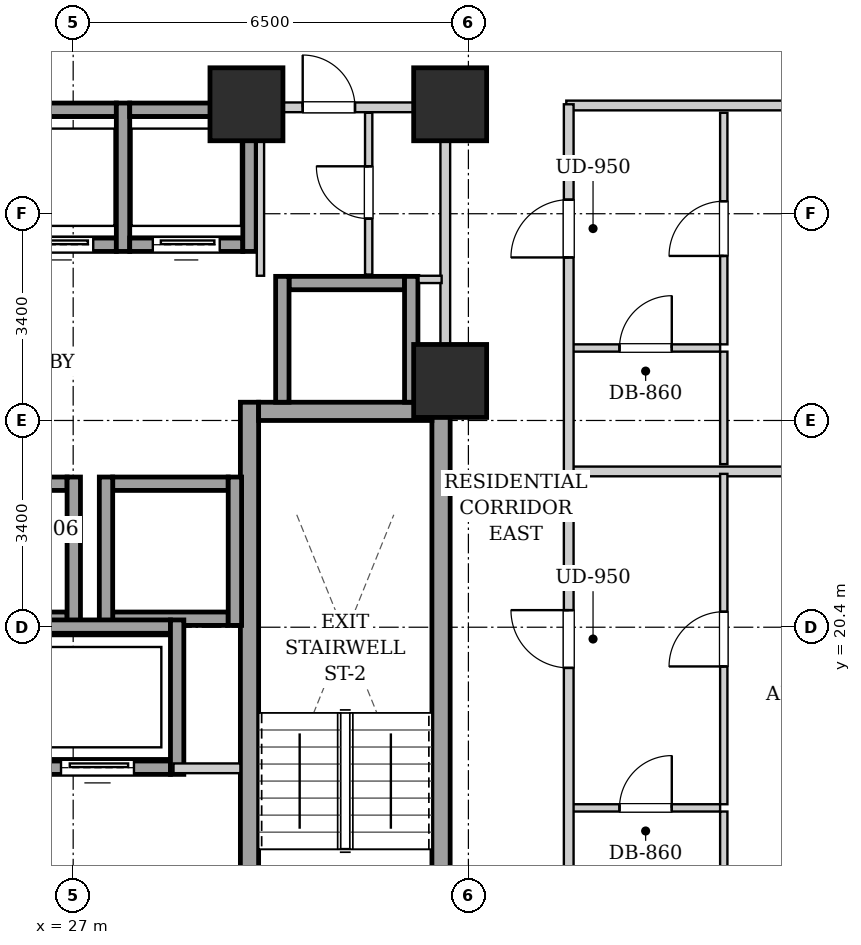
"""IFC4 building model, lengths in metres.
Left out: names, types, materials, properties, quantities, classifications, styles, units other than length and angle.
Written with IfcOpenShell. Run it as: python <this file> out.ifc"""

import sys

from ifc_helpers import new_model, si_unit, direction, frame, frame_2d, origin, origin_2d, place, context, subcontext, project, spatial, rectangle, extrude, element, fill, save


model = new_model("IFC4")
c1 = context("Model", 3, precision=1e-05, world=origin(), true_north=direction((0.0, 1.0)))
c2 = subcontext(c1, "Body", "Model", "MODEL_VIEW")
j1 = project(units=[si_unit("LENGTHUNIT", "METRE"), si_unit("PLANEANGLEUNIT", "RADIAN")], contexts=[c1])
p1 = place(None, origin())
s1 = spatial("IfcSite", under=j1, at=p1, CompositionType="ELEMENT")
p2 = place(p1, origin())
s2 = spatial("IfcBuilding", under=s1, at=p2, CompositionType="ELEMENT")
p3 = place(p2, frame((0.0, 0.0, 32.2)))
s3 = spatial("IfcBuildingStorey", under=s2, at=p3, CompositionType="ELEMENT", Elevation=32.2)
for number, where, z_axis, x_axis in (
    (1, (29.85, 29.0, 0.0), (0.0, 0.0, 1.0), (1.0, 0.0, 0.0)),
    (2, (33.2, 29.0, 0.0), (0.0, 0.0, 1.0), (1.0, 0.0, 0.0)),
    (3, (33.2, 24.45, 0.0), (0.0, 0.0, 1.0), (1.0, 0.0, 0.0)),
):
    element("IfcColumn", number, at=place(p3, frame(where, z_axis=z_axis, x_axis=x_axis)), inside=s3, PredefinedType="COLUMN", context=c2, shape_type="SweptSolid", body=[
        extrude(rectangle(XDim=1.2, YDim=1.2, at=origin_2d()), origin(), (0.0, 0.0, 1.0), 3.2),
    ])
for number, where, z_axis, x_axis in (
    (4, (29.9, 15.1, 0.0), (0.0, 0.0, 1.0), (0.0, 1.0, 0.0)),
    (5, (33.05, 15.1, 0.0), (0.0, 0.0, 1.0), (0.0, 1.0, 0.0)),
):
    element("IfcWall", number, at=place(p3, frame(where, z_axis=z_axis, x_axis=x_axis)), inside=s3, PredefinedType="SHEAR", context=c2, shape_type="SweptSolid", body=[
        extrude(rectangle(XDim=9.0, YDim=0.3, at=frame_2d((4.5, 0.0))), origin(), (0.0, 0.0, 1.0), 2.94),
    ])
p4 = place(p3, frame((30.05, 23.95, 0.0), z_axis=(0.0, 0.0, 1.0), x_axis=(1.0, 0.0, 0.0)))
e6 = element("IfcWall", 6, at=p4, inside=s3, PredefinedType="SHEAR", context=c2, shape_type="SweptSolid", body=[
    extrude(rectangle(XDim=2.85, YDim=0.3, at=frame_2d((1.425, 0.0))), origin(), (0.0, 0.0, 1.0), 2.94),
])
p5 = place(p3, frame((25.85, 26.69, 0.0), z_axis=(0.0, 0.0, 1.0), x_axis=(1.0, 0.0, 0.0)))
e7 = element("IfcWall", 7, at=p5, inside=s3, PredefinedType="SHEAR", context=c2, shape_type="SweptSolid", body=[
    extrude(rectangle(XDim=1.86, YDim=0.22, at=frame_2d((0.93, 0.0))), origin(), (0.0, 0.0, 1.0), 2.94),
])
p6 = place(p5, frame((0.38, 0.0, 0.0)))
e8 = element("IfcOpeningElement", 8, at=p6, cuts=e7, PredefinedType="OPENING", context=c2, shape_type="SweptSolid", body=[
    extrude(rectangle(XDim=1.1, YDim=2.15, at=frame_2d((0.55, 1.075))), frame((0.0, 0.12, 0.0), z_axis=(0.0, -1.0, 0.0), x_axis=(1.0, 0.0, 0.0)), (0.0, 0.0, 1.0), 0.24),
])
p7 = place(p3, frame((25.85, 28.91, 0.0), z_axis=(0.0, 0.0, 1.0), x_axis=(1.0, 0.0, 0.0)))
e9 = element("IfcWall", 9, at=p7, inside=s3, PredefinedType="SHEAR", context=c2, shape_type="SweptSolid", body=[
    extrude(rectangle(XDim=1.86, YDim=0.22, at=frame_2d((0.93, 0.0))), origin(), (0.0, 0.0, 1.0), 2.94),
])
p8 = place(p3, frame((27.82, 26.58, 0.0), z_axis=(0.0, 0.0, 1.0), x_axis=(0.0, 1.0, 0.0)))
e10 = element("IfcWall", 10, at=p8, inside=s3, PredefinedType="SHEAR", context=c2, shape_type="SweptSolid", body=[
    extrude(rectangle(XDim=2.44, YDim=0.22, at=frame_2d((1.22, 0.0))), origin(), (0.0, 0.0, 1.0), 2.94),
])
p9 = place(p3, frame((27.93, 26.69, 0.0), z_axis=(0.0, 0.0, 1.0), x_axis=(1.0, 0.0, 0.0)))
e11 = element("IfcWall", 11, at=p9, inside=s3, PredefinedType="SHEAR", context=c2, shape_type="SweptSolid", body=[
    extrude(rectangle(XDim=1.86, YDim=0.22, at=frame_2d((0.93, 0.0))), origin(), (0.0, 0.0, 1.0), 2.94),
])
p10 = place(p9, frame((0.38, 0.0, 0.0)))
e12 = element("IfcOpeningElement", 12, at=p10, cuts=e11, PredefinedType="OPENING", context=c2, shape_type="SweptSolid", body=[
    extrude(rectangle(XDim=1.1, YDim=2.15, at=frame_2d((0.55, 1.075))), frame((0.0, 0.12, 0.0), z_axis=(0.0, -1.0, 0.0), x_axis=(1.0, 0.0, 0.0)), (0.0, 0.0, 1.0), 0.24),
])
p11 = place(p3, frame((27.93, 28.91, 0.0), z_axis=(0.0, 0.0, 1.0), x_axis=(1.0, 0.0, 0.0)))
e13 = element("IfcWall", 13, at=p11, inside=s3, PredefinedType="SHEAR", context=c2, shape_type="SweptSolid", body=[
    extrude(rectangle(XDim=1.86, YDim=0.22, at=frame_2d((0.93, 0.0))), origin(), (0.0, 0.0, 1.0), 2.94),
])
p12 = place(p3, frame((29.9, 26.58, 0.0), z_axis=(0.0, 0.0, 1.0), x_axis=(0.0, 1.0, 0.0)))
e14 = element("IfcWall", 14, at=p12, inside=s3, PredefinedType="SHEAR", context=c2, shape_type="SweptSolid", body=[
    extrude(rectangle(XDim=2.44, YDim=0.22, at=frame_2d((1.22, 0.0))), origin(), (0.0, 0.0, 1.0), 2.94),
])
for number, where, z_axis, x_axis in (
    (15, (25.0, 20.54, 0.0), (0.0, 0.0, 1.0), (1.0, 0.0, 0.0)),
    (16, (25.0, 22.76, 0.0), (0.0, 0.0, 1.0), (1.0, 0.0, 0.0)),
):
    element("IfcWall", number, at=place(p3, frame(where, z_axis=z_axis, x_axis=x_axis)), inside=s3, PredefinedType="SHEAR", context=c2, shape_type="SweptSolid", body=[
        extrude(rectangle(XDim=1.9, YDim=0.22, at=frame_2d((0.95, 0.0))), origin(), (0.0, 0.0, 1.0), 2.94),
    ])
p13 = place(p3, frame((27.01, 20.43, 0.0), z_axis=(0.0, 0.0, 1.0), x_axis=(0.0, 1.0, 0.0)))
e17 = element("IfcWall", 17, at=p13, inside=s3, PredefinedType="SHEAR", context=c2, shape_type="SweptSolid", body=[
    extrude(rectangle(XDim=2.44, YDim=0.22, at=frame_2d((1.22, 0.0))), origin(), (0.0, 0.0, 1.0), 2.94),
])
for number, where, z_axis, x_axis in (
    (18, (27.65, 20.54, 0.0), (0.0, 0.0, 1.0), (1.0, 0.0, 0.0)),
    (19, (27.65, 22.76, 0.0), (0.0, 0.0, 1.0), (1.0, 0.0, 0.0)),
):
    element("IfcWall", number, at=place(p3, frame(where, z_axis=z_axis, x_axis=x_axis)), inside=s3, PredefinedType="SHEAR", context=c2, shape_type="SweptSolid", body=[
        extrude(rectangle(XDim=1.9, YDim=0.22, at=frame_2d((0.95, 0.0))), origin(), (0.0, 0.0, 1.0), 2.94),
    ])
for number, where, z_axis, x_axis in (
    (20, (27.54, 20.43, 0.0), (0.0, 0.0, 1.0), (0.0, 1.0, 0.0)),
    (21, (29.66, 20.43, 0.0), (0.0, 0.0, 1.0), (0.0, 1.0, 0.0)),
):
    element("IfcWall", number, at=place(p3, frame(where, z_axis=z_axis, x_axis=x_axis)), inside=s3, PredefinedType="SHEAR", context=c2, shape_type="SweptSolid", body=[
        extrude(rectangle(XDim=2.44, YDim=0.22, at=frame_2d((1.22, 0.0))), origin(), (0.0, 0.0, 1.0), 2.94),
    ])
p14 = place(p3, frame((30.55, 26.06, 0.0), z_axis=(0.0, 0.0, 1.0), x_axis=(1.0, 0.0, 0.0)))
e22 = element("IfcWall", 22, at=p14, inside=s3, PredefinedType="SHEAR", context=c2, shape_type="SweptSolid", body=[
    extrude(rectangle(XDim=1.9, YDim=0.22, at=frame_2d((0.95, 0.0))), origin(), (0.0, 0.0, 1.0), 2.94),
])
for number, where, z_axis, x_axis in (
    (23, (30.44, 24.1, 0.0), (0.0, 0.0, 1.0), (0.0, 1.0, 0.0)),
    (24, (32.56, 24.1, 0.0), (0.0, 0.0, 1.0), (0.0, 1.0, 0.0)),
):
    element("IfcWall", number, at=place(p3, frame(where, z_axis=z_axis, x_axis=x_axis)), inside=s3, PredefinedType="SHEAR", context=c2, shape_type="SweptSolid", body=[
        extrude(rectangle(XDim=2.07, YDim=0.22, at=frame_2d((1.035, 0.0))), origin(), (0.0, 0.0, 1.0), 2.94),
    ])
p15 = place(p3, frame((26.2, 18.09, 0.0), z_axis=(0.0, 0.0, 1.0), x_axis=(1.0, 0.0, 0.0)))
e25 = element("IfcWall", 25, at=p15, inside=s3, PredefinedType="SHEAR", context=c2, shape_type="SweptSolid", body=[
    extrude(rectangle(XDim=2.4, YDim=0.22, at=frame_2d((1.2, 0.0))), origin(), (0.0, 0.0, 1.0), 2.94),
])
p16 = place(p15, frame((0.6, 0.0, 0.0)))
e26 = element("IfcOpeningElement", 26, at=p16, cuts=e25, PredefinedType="OPENING", context=c2, shape_type="SweptSolid", body=[
    extrude(rectangle(XDim=1.2, YDim=2.15, at=frame_2d((0.6, 1.075))), frame((0.0, 0.12, 0.0), z_axis=(0.0, -1.0, 0.0), x_axis=(1.0, 0.0, 0.0)), (0.0, 0.0, 1.0), 0.24),
])
p17 = place(p3, frame((26.2, 20.41, 0.0), z_axis=(0.0, 0.0, 1.0), x_axis=(1.0, 0.0, 0.0)))
e27 = element("IfcWall", 27, at=p17, inside=s3, PredefinedType="SHEAR", context=c2, shape_type="SweptSolid", body=[
    extrude(rectangle(XDim=2.4, YDim=0.22, at=frame_2d((1.2, 0.0))), origin(), (0.0, 0.0, 1.0), 2.94),
])
p18 = place(p3, frame((28.71, 17.98, 0.0), z_axis=(0.0, 0.0, 1.0), x_axis=(0.0, 1.0, 0.0)))
e28 = element("IfcWall", 28, at=p18, inside=s3, PredefinedType="SHEAR", context=c2, shape_type="SweptSolid", body=[
    extrude(rectangle(XDim=2.54, YDim=0.22, at=frame_2d((1.27, 0.0))), origin(), (0.0, 0.0, 1.0), 2.94),
])
p19 = place(p3, frame((28.65, 18.08, 0.0), z_axis=(0.0, 0.0, 1.0), x_axis=(1.0, 0.0, 0.0)))
e29 = element("IfcWall", 29, at=p19, inside=s3, PredefinedType="PARTITIONING", context=c2, shape_type="SweptSolid", body=[
    extrude(rectangle(XDim=1.1, YDim=0.16, at=frame_2d((0.55, 0.0))), origin(), (0.0, 0.0, 1.0), 2.94),
])
p20 = place(p3, frame((33.12, 24.12, 0.0), z_axis=(0.0, 0.0, 1.0), x_axis=(0.0, 1.0, 0.0)))
e30 = element("IfcWall", 30, at=p20, inside=s3, PredefinedType="PARTITIONING", context=c2, shape_type="SweptSolid", body=[
    extrude(rectangle(XDim=4.76, YDim=0.16, at=frame_2d((2.38, 0.0))), origin(), (0.0, 0.0, 1.0), 2.94),
])
p21 = place(p3, frame((30.08, 26.18, 0.0), z_axis=(0.0, 0.0, 1.0), x_axis=(0.0, 1.0, 0.0)))
e31 = element("IfcWall", 31, at=p21, inside=s3, PredefinedType="PARTITIONING", context=c2, shape_type="SweptSolid", body=[
    extrude(rectangle(XDim=2.68, YDim=0.12, at=frame_2d((1.34, 0.0))), origin(), (0.0, 0.0, 1.0), 2.94),
])
p22 = place(p3, frame((32.68, 26.12, 0.0), z_axis=(0.0, 0.0, 1.0), x_axis=(1.0, 0.0, 0.0)))
e32 = element("IfcWall", 32, at=p22, inside=s3, PredefinedType="PARTITIONING", context=c2, shape_type="SweptSolid", body=[
    extrude(rectangle(XDim=0.38, YDim=0.12, at=frame_2d((0.19, 0.0))), origin(), (0.0, 0.0, 1.0), 2.94),
])
p23 = place(p3, frame((31.86, 26.2, 0.0), z_axis=(0.0, 0.0, 1.0), x_axis=(0.0, 1.0, 0.0)))
e33 = element("IfcWall", 33, at=p23, inside=s3, PredefinedType="PARTITIONING", context=c2, shape_type="SweptSolid", body=[
    extrude(rectangle(XDim=2.66, YDim=0.12, at=frame_2d((1.33, 0.0))), origin(), (0.0, 0.0, 1.0), 2.94),
])
p24 = place(p23, frame((0.92, 0.0, 0.0)))
e34 = element("IfcOpeningElement", 34, at=p24, cuts=e33, PredefinedType="OPENING", context=c2, shape_type="SweptSolid", body=[
    extrude(rectangle(XDim=0.86, YDim=2.05, at=frame_2d((0.43, 1.025))), frame((0.0, 0.07, 0.0), z_axis=(0.0, -1.0, 0.0), x_axis=(1.0, 0.0, 0.0)), (0.0, 0.0, 1.0), 0.14),
])
p25 = place(p3, frame((30.08, 28.95, 0.0), z_axis=(0.0, 0.0, 1.0), x_axis=(1.0, 0.0, 0.0)))
e35 = element("IfcWall", 35, at=p25, inside=s3, PredefinedType="PARTITIONING", context=c2, shape_type="SweptSolid", body=[
    extrude(rectangle(XDim=2.96, YDim=0.16, at=frame_2d((1.48, 0.0))), origin(), (0.0, 0.0, 1.0), 2.94),
])
p26 = place(p25, frame((0.695, 0.0, 0.0)))
e36 = element("IfcOpeningElement", 36, at=p26, cuts=e35, PredefinedType="OPENING", context=c2, shape_type="SweptSolid", body=[
    extrude(rectangle(XDim=0.86, YDim=2.05, at=frame_2d((0.43, 1.025))), frame((0.0, 0.09, 0.0), z_axis=(0.0, -1.0, 0.0), x_axis=(1.0, 0.0, 0.0)), (0.0, 0.0, 1.0), 0.18),
])
p27 = place(p3, frame((35.11, 28.98, 0.0), z_axis=(0.0, 0.0, 1.0), x_axis=(1.0, 0.0, 0.0)))
e37 = element("IfcWall", 37, at=p27, inside=s3, PredefinedType="PARTITIONING", context=c2, shape_type="SweptSolid", body=[
    extrude(rectangle(XDim=11.11, YDim=0.16, at=frame_2d((5.555, 0.0))), origin(), (0.0, 0.0, 1.0), 2.155),
])
p28 = place(p3, frame((35.19, 22.962, 0.0), z_axis=(0.0, 0.0, 1.0), x_axis=(1.0, 0.0, 0.0)))
e38 = element("IfcWall", 38, at=p28, inside=s3, PredefinedType="PARTITIONING", context=c2, shape_type="SweptSolid", body=[
    extrude(rectangle(XDim=11.03, YDim=0.16, at=frame_2d((5.515, 0.0))), origin(), (0.0, 0.0, 1.0), 2.94),
])
p29 = place(p3, frame((35.19, 17.429, 0.0), z_axis=(0.0, 0.0, 1.0), x_axis=(1.0, 0.0, 0.0)))
e39 = element("IfcWall", 39, at=p29, inside=s3, PredefinedType="PARTITIONING", context=c2, shape_type="SweptSolid", body=[
    extrude(rectangle(XDim=2.45, YDim=0.12, at=frame_2d((1.225, 0.0))), origin(), (0.0, 0.0, 1.0), 2.94),
])
p30 = place(p29, frame((0.795, 0.0, 0.0)))
e40 = element("IfcOpeningElement", 40, at=p30, cuts=e39, PredefinedType="OPENING", context=c2, shape_type="SweptSolid", body=[
    extrude(rectangle(XDim=0.86, YDim=2.05, at=frame_2d((0.43, 1.025))), frame((0.0, 0.07, 0.0), z_axis=(0.0, -1.0, 0.0), x_axis=(1.0, 0.0, 0.0)), (0.0, 0.0, 1.0), 0.14),
])
p31 = place(p3, frame((37.7, 15.21, 0.0), z_axis=(0.0, 0.0, 1.0), x_axis=(0.0, 1.0, 0.0)))
e41 = element("IfcWall", 41, at=p31, inside=s3, PredefinedType="PARTITIONING", context=c2, shape_type="SweptSolid", body=[
    extrude(rectangle(XDim=2.159, YDim=0.12, at=frame_2d((1.08, 0.0))), origin(), (0.0, 0.0, 1.0), 2.94),
])
p32 = place(p3, frame((37.7, 17.489, 0.0), z_axis=(0.0, 0.0, 1.0), x_axis=(0.0, 1.0, 0.0)))
e42 = element("IfcWall", 42, at=p32, inside=s3, PredefinedType="PARTITIONING", context=c2, shape_type="SweptSolid", body=[
    extrude(rectangle(XDim=5.433, YDim=0.12, at=frame_2d((2.717, 0.0))), origin(), (0.0, 0.0, 1.0), 2.94),
])
p33 = place(p32, frame((2.266, 0.0, 0.0)))
e43 = element("IfcOpeningElement", 43, at=p33, cuts=e42, PredefinedType="OPENING", context=c2, shape_type="SweptSolid", body=[
    extrude(rectangle(XDim=0.9, YDim=2.05, at=frame_2d((0.45, 1.025))), frame((0.0, 0.07, 0.0), z_axis=(0.0, -1.0, 0.0), x_axis=(1.0, 0.0, 0.0)), (0.0, 0.0, 1.0), 0.14),
])
p34 = place(p3, frame((35.19, 24.992, 0.0), z_axis=(0.0, 0.0, 1.0), x_axis=(1.0, 0.0, 0.0)))
e44 = element("IfcWall", 44, at=p34, inside=s3, PredefinedType="PARTITIONING", context=c2, shape_type="SweptSolid", body=[
    extrude(rectangle(XDim=2.45, YDim=0.12, at=frame_2d((1.225, 0.0))), origin(), (0.0, 0.0, 1.0), 2.94),
])
p35 = place(p34, frame((0.795, 0.0, 0.0)))
e45 = element("IfcOpeningElement", 45, at=p35, cuts=e44, PredefinedType="OPENING", context=c2, shape_type="SweptSolid", body=[
    extrude(rectangle(XDim=0.86, YDim=2.05, at=frame_2d((0.43, 1.025))), frame((0.0, 0.07, 0.0), z_axis=(0.0, -1.0, 0.0), x_axis=(1.0, 0.0, 0.0)), (0.0, 0.0, 1.0), 0.14),
])
p36 = place(p3, frame((37.7, 23.082, 0.0), z_axis=(0.0, 0.0, 1.0), x_axis=(0.0, 1.0, 0.0)))
e46 = element("IfcWall", 46, at=p36, inside=s3, PredefinedType="PARTITIONING", context=c2, shape_type="SweptSolid", body=[
    extrude(rectangle(XDim=1.85, YDim=0.12, at=frame_2d((0.925, 0.0))), origin(), (0.0, 0.0, 1.0), 2.94),
])
p37 = place(p3, frame((37.7, 25.052, 0.0), z_axis=(0.0, 0.0, 1.0), x_axis=(0.0, 1.0, 0.0)))
e47 = element("IfcWall", 47, at=p37, inside=s3, PredefinedType="PARTITIONING", context=c2, shape_type="SweptSolid", body=[
    extrude(rectangle(XDim=3.808, YDim=0.12, at=frame_2d((1.904, 0.0))), origin(), (0.0, 0.0, 1.0), 2.94),
])
p38 = place(p37, frame((1.454, 0.0, 0.0)))
e48 = element("IfcOpeningElement", 48, at=p38, cuts=e47, PredefinedType="OPENING", context=c2, shape_type="SweptSolid", body=[
    extrude(rectangle(XDim=0.9, YDim=2.05, at=frame_2d((0.45, 1.025))), frame((0.0, 0.07, 0.0), z_axis=(0.0, -1.0, 0.0), x_axis=(1.0, 0.0, 0.0)), (0.0, 0.0, 1.0), 0.14),
])
p39 = place(p3, frame((35.15, 15.07, 0.0), z_axis=(0.0, 0.0, 1.0), x_axis=(0.0, 1.0, 0.0)))
e49 = element("IfcWall", 49, at=p39, inside=s3, PredefinedType="PARTITIONING", context=c2, shape_type="SweptSolid", body=[
    extrude(rectangle(XDim=13.93, YDim=0.16, at=frame_2d((6.965, 0.0))), origin(), (0.0, 0.0, 1.0), 2.94),
])
p40 = place(p39, frame((4.661, 0.0, 0.0)))
e50 = element("IfcOpeningElement", 50, at=p40, cuts=e49, PredefinedType="OPENING", context=c2, shape_type="SweptSolid", body=[
    extrude(rectangle(XDim=0.95, YDim=2.1, at=frame_2d((0.475, 1.05))), frame((0.0, 0.09, 0.0), z_axis=(0.0, -1.0, 0.0), x_axis=(1.0, 0.0, 0.0)), (0.0, 0.0, 1.0), 0.18),
])
p41 = place(p39, frame((11.411, 0.0, 0.0)))
e51 = element("IfcOpeningElement", 51, at=p41, cuts=e49, PredefinedType="OPENING", context=c2, shape_type="SweptSolid", body=[
    extrude(rectangle(XDim=0.95, YDim=2.1, at=frame_2d((0.475, 1.05))), frame((0.0, 0.09, 0.0), z_axis=(0.0, -1.0, 0.0), x_axis=(1.0, 0.0, 0.0)), (0.0, 0.0, 1.0), 0.18),
])
p42 = place(p6, origin())
e52 = element("IfcDoor", 52, at=p42, inside=s3, OperationType="SLIDING_TO_LEFT", PredefinedType="DOOR", context=c2, shape_type="SweptSolid", body=[
    extrude(rectangle(XDim=1.1, YDim=2.15, at=frame_2d((0.55, 1.075))), frame((0.0, 0.025, 0.0), z_axis=(0.0, -1.0, 0.0), x_axis=(1.0, 0.0, 0.0)), (0.0, 0.0, 1.0), 0.05),
])
fill(e8, e52)
p43 = place(p10, origin())
e53 = element("IfcDoor", 53, at=p43, inside=s3, OperationType="SLIDING_TO_LEFT", PredefinedType="DOOR", context=c2, shape_type="SweptSolid", body=[
    extrude(rectangle(XDim=1.1, YDim=2.15, at=frame_2d((0.55, 1.075))), frame((0.0, 0.025, 0.0), z_axis=(0.0, -1.0, 0.0), x_axis=(1.0, 0.0, 0.0)), (0.0, 0.0, 1.0), 0.05),
])
fill(e12, e53)
p44 = place(p16, origin())
e54 = element("IfcDoor", 54, at=p44, inside=s3, OperationType="SLIDING_TO_LEFT", PredefinedType="DOOR", context=c2, shape_type="SweptSolid", body=[
    extrude(rectangle(XDim=1.2, YDim=2.15, at=frame_2d((0.6, 1.075))), frame((0.0, 0.025, 0.0), z_axis=(0.0, -1.0, 0.0), x_axis=(1.0, 0.0, 0.0)), (0.0, 0.0, 1.0), 0.05),
])
fill(e26, e54)
p45 = place(p24, origin())
e55 = element("IfcDoor", 55, at=p45, inside=s3, OperationType="SINGLE_SWING_RIGHT", PredefinedType="DOOR", context=c2, shape_type="SweptSolid", body=[
    extrude(rectangle(XDim=0.86, YDim=2.05, at=frame_2d((0.43, 1.025))), frame((0.0, 0.025, 0.0), z_axis=(0.0, -1.0, 0.0), x_axis=(1.0, 0.0, 0.0)), (0.0, 0.0, 1.0), 0.05),
])
fill(e34, e55)
p46 = place(p26, origin())
e56 = element("IfcDoor", 56, at=p46, inside=s3, OperationType="SINGLE_SWING_LEFT", PredefinedType="DOOR", context=c2, shape_type="SweptSolid", body=[
    extrude(rectangle(XDim=0.86, YDim=2.05, at=frame_2d((0.43, 1.025))), frame((0.0, 0.025, 0.0), z_axis=(0.0, -1.0, 0.0), x_axis=(1.0, 0.0, 0.0)), (0.0, 0.0, 1.0), 0.05),
])
fill(e36, e56)
p47 = place(p30, origin())
e57 = element("IfcDoor", 57, at=p47, inside=s3, OperationType="SINGLE_SWING_RIGHT", PredefinedType="DOOR", context=c2, shape_type="SweptSolid", body=[
    extrude(rectangle(XDim=0.86, YDim=2.05, at=frame_2d((0.43, 1.025))), frame((0.0, 0.025, 0.0), z_axis=(0.0, -1.0, 0.0), x_axis=(1.0, 0.0, 0.0)), (0.0, 0.0, 1.0), 0.05),
])
fill(e40, e57)
p48 = place(p33, origin())
e58 = element("IfcDoor", 58, at=p48, inside=s3, OperationType="SINGLE_SWING_LEFT", PredefinedType="DOOR", context=c2, shape_type="SweptSolid", body=[
    extrude(rectangle(XDim=0.9, YDim=2.05, at=frame_2d((0.45, 1.025))), frame((0.0, 0.025, 0.0), z_axis=(0.0, -1.0, 0.0), x_axis=(1.0, 0.0, 0.0)), (0.0, 0.0, 1.0), 0.05),
])
fill(e43, e58)
p49 = place(p35, origin())
e59 = element("IfcDoor", 59, at=p49, inside=s3, OperationType="SINGLE_SWING_RIGHT", PredefinedType="DOOR", context=c2, shape_type="SweptSolid", body=[
    extrude(rectangle(XDim=0.86, YDim=2.05, at=frame_2d((0.43, 1.025))), frame((0.0, 0.025, 0.0), z_axis=(0.0, -1.0, 0.0), x_axis=(1.0, 0.0, 0.0)), (0.0, 0.0, 1.0), 0.05),
])
fill(e45, e59)
p50 = place(p38, origin())
e60 = element("IfcDoor", 60, at=p50, inside=s3, OperationType="SINGLE_SWING_LEFT", PredefinedType="DOOR", context=c2, shape_type="SweptSolid", body=[
    extrude(rectangle(XDim=0.9, YDim=2.05, at=frame_2d((0.45, 1.025))), frame((0.0, 0.025, 0.0), z_axis=(0.0, -1.0, 0.0), x_axis=(1.0, 0.0, 0.0)), (0.0, 0.0, 1.0), 0.05),
])
fill(e48, e60)
p51 = place(p40, origin())
e61 = element("IfcDoor", 61, at=p51, inside=s3, OperationType="SINGLE_SWING_RIGHT", PredefinedType="DOOR", context=c2, shape_type="SweptSolid", body=[
    extrude(rectangle(XDim=0.95, YDim=2.1, at=frame_2d((0.475, 1.05))), frame((0.0, 0.025, 0.0), z_axis=(0.0, -1.0, 0.0), x_axis=(1.0, 0.0, 0.0)), (0.0, 0.0, 1.0), 0.05),
])
fill(e50, e61)
p52 = place(p41, origin())
e62 = element("IfcDoor", 62, at=p52, inside=s3, OperationType="SINGLE_SWING_LEFT", PredefinedType="DOOR", context=c2, shape_type="SweptSolid", body=[
    extrude(rectangle(XDim=0.95, YDim=2.1, at=frame_2d((0.475, 1.05))), frame((0.0, 0.025, 0.0), z_axis=(0.0, -1.0, 0.0), x_axis=(1.0, 0.0, 0.0)), (0.0, 0.0, 1.0), 0.05),
])
fill(e51, e62)
save(model, sys.argv[1])
